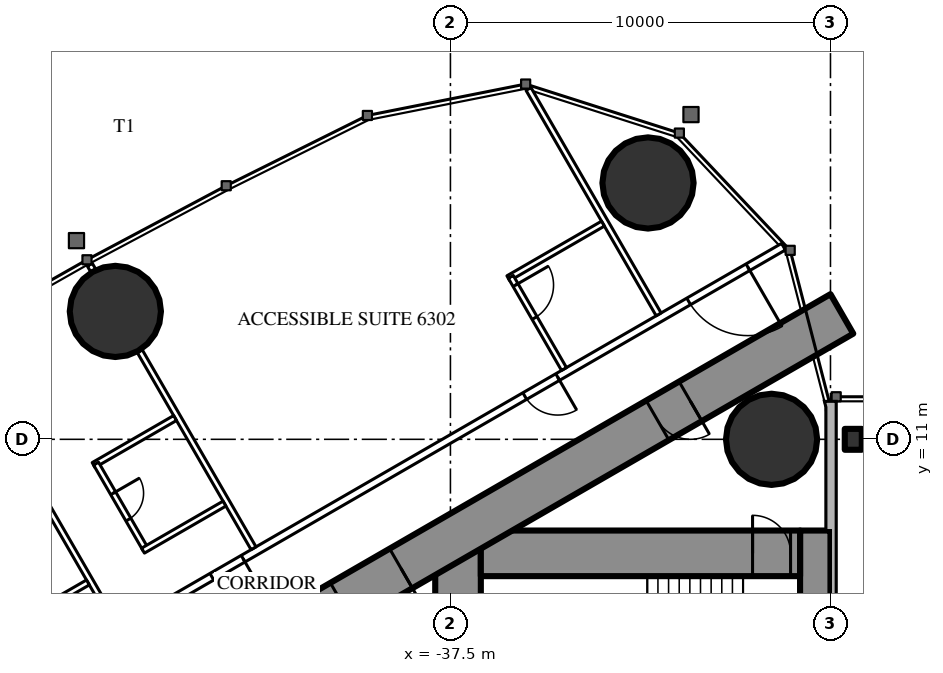
"""IFC4 building model, lengths in metres.
Left out: names, types, materials, properties, quantities, classifications, styles, units other than length and angle.
Written with IfcOpenShell. Run it as: python <this file> out.ifc"""

import sys

from ifc_helpers import new_model, si_unit, direction, frame, frame_2d, origin, origin_2d, place, context, subcontext, project, spatial, rectangle, circle, i_section, extrude, element, fill, save


model = new_model("IFC4")
c1 = context("Model", 3, precision=1e-05, world=origin(), true_north=direction((0.0, 1.0)))
c2 = subcontext(c1, "Body", "Model", "MODEL_VIEW")
j1 = project(units=[si_unit("LENGTHUNIT", "METRE"), si_unit("PLANEANGLEUNIT", "RADIAN")], contexts=[c1])
p1 = place(None, origin())
s1 = spatial("IfcSite", under=j1, at=p1, CompositionType="ELEMENT")
p2 = place(p1, origin())
s2 = spatial("IfcBuilding", under=s1, at=p2, CompositionType="ELEMENT")
p3 = place(p2, frame((0.0, 0.0, 236.9)))
s3 = spatial("IfcBuildingStorey", under=s2, at=p3, CompositionType="ELEMENT", Elevation=236.9)
for number, where, z_axis, x_axis in (
    (1, (-32.301, 17.745, 0.0), (0.0, 0.0, 1.0), (1.0, 0.0, 0.0)),
    (2, (-29.05, 11.0, 0.0), (0.0, 0.0, 1.0), (1.0, 0.0, 0.0)),
    (3, (-46.317, 14.365, 0.0), (0.0, 0.0, 1.0), (1.0, 0.0, 0.0)),
):
    element("IfcColumn", number, at=place(p3, frame(where, z_axis=z_axis, x_axis=x_axis)), inside=s3, PredefinedType="COLUMN", context=c2, shape_type="SweptSolid", body=[
        extrude(circle(Radius=1.2, at=origin_2d()), origin(), (0.0, 0.0, 1.0), 3.6),
    ])
p4 = place(p3, frame((-27.9, 8.6, 0.0), z_axis=(0.0, 0.0, 1.0), x_axis=(0.0, -1.0, 0.0)))
e4 = element("IfcWall", 4, at=p4, inside=s3, PredefinedType="SHEAR", context=c2, shape_type="SweptSolid", body=[
    extrude(rectangle(XDim=17.2, YDim=0.8, at=frame_2d((8.6, 0.0))), origin(), (0.0, 0.0, 1.0), 3.6),
])
p5 = place(p4, frame((6.95, 0.0, 0.0)))
e5 = element("IfcOpeningElement", 5, at=p5, cuts=e4, PredefinedType="OPENING", context=c2, shape_type="SweptSolid", body=[
    extrude(rectangle(XDim=0.9, YDim=2.2, at=frame_2d((0.45, 1.1))), frame((0.0, 0.41, 0.0), z_axis=(0.0, -1.0, 0.0), x_axis=(1.0, 0.0, 0.0)), (0.0, 0.0, 1.0), 0.82),
])
p6 = place(p3, frame((-37.3, 8.6, 0.0), z_axis=(0.0, 0.0, 1.0), x_axis=(0.0, -1.0, 0.0)))
e6 = element("IfcWall", 6, at=p6, inside=s3, PredefinedType="SHEAR", context=c2, shape_type="SweptSolid", body=[
    extrude(rectangle(XDim=17.2, YDim=1.2, at=frame_2d((8.6, 0.0))), origin(), (0.0, 0.0, 1.0), 3.6),
])
p7 = place(p6, frame((7.7, 0.0, 0.0)))
e7 = element("IfcOpeningElement", 7, at=p7, cuts=e6, PredefinedType="OPENING", context=c2, shape_type="SweptSolid", body=[
    extrude(rectangle(XDim=1.8, YDim=2.2, at=frame_2d((0.9, 1.1))), frame((0.0, 0.61, 0.0), z_axis=(0.0, -1.0, 0.0), x_axis=(1.0, 0.0, 0.0)), (0.0, 0.0, 1.0), 1.22),
])
p8 = place(p3, frame((-28.3, 8.0, 0.0), z_axis=(0.0, 0.0, 1.0), x_axis=(-1.0, 0.0, 0.0)))
e8 = element("IfcWall", 8, at=p8, inside=s3, PredefinedType="SHEAR", context=c2, shape_type="SweptSolid", body=[
    extrude(rectangle(XDim=8.4, YDim=1.2, at=frame_2d((4.2, 0.0))), origin(), (0.0, 0.0, 1.0), 3.6),
])
p9 = place(p8, frame((0.25, 0.0, 0.0)))
e9 = element("IfcOpeningElement", 9, at=p9, cuts=e8, PredefinedType="OPENING", context=c2, shape_type="SweptSolid", body=[
    extrude(rectangle(XDim=1.0, YDim=2.2, at=frame_2d((0.5, 1.1))), frame((0.0, 0.61, 0.0), z_axis=(0.0, -1.0, 0.0), x_axis=(1.0, 0.0, 0.0)), (0.0, 0.0, 1.0), 1.22),
])
p10 = place(p3, frame((-27.2, 14.3, 0.0), z_axis=(0.0, 0.0, 1.0), x_axis=(-0.866026593062, -0.499997940104, 0.0)))
e10 = element("IfcWall", 10, at=p10, inside=s3, PredefinedType="SHEAR", context=c2, shape_type="SweptSolid", body=[
    extrude(rectangle(XDim=28.946, YDim=1.2, at=frame_2d((14.473, 0.0))), origin(), (0.0, 0.0, 1.0), 3.6),
])
p11 = place(p10, frame((4.6, 0.0, 0.0)))
e11 = element("IfcOpeningElement", 11, at=p11, cuts=e10, PredefinedType="OPENING", context=c2, shape_type="SweptSolid", body=[
    extrude(rectangle(XDim=1.0, YDim=2.2, at=frame_2d((0.5, 1.1))), frame((0.0, 0.61, 0.0), z_axis=(0.0, -1.0, 0.0), x_axis=(1.0, 0.0, 0.0)), (0.0, 0.0, 1.0), 1.22),
])
p12 = place(p10, frame((13.395, 0.0, 0.0)))
e12 = element("IfcOpeningElement", 12, at=p12, cuts=e10, PredefinedType="OPENING", context=c2, shape_type="SweptSolid", body=[
    extrude(rectangle(XDim=1.8, YDim=2.2, at=frame_2d((0.9, 1.1))), frame((0.0, 0.61, 0.0), z_axis=(0.0, -1.0, 0.0), x_axis=(1.0, 0.0, 0.0)), (0.0, 0.0, 1.0), 1.22),
])
p13 = place(p3, frame((-26.9, 11.0, 0.0), z_axis=(0.0, 0.0, 1.0), x_axis=(1.0, 0.0, 0.0)))
e13 = element("IfcColumn", 13, at=p13, inside=s3, PredefinedType="COLUMN", context=c2, shape_type="SweptSolid", body=[
    extrude(i_section(OverallWidth=0.448, OverallDepth=0.55, WebThickness=0.072, FlangeThickness=0.115, FilletRadius=0.02, at=origin_2d()), origin(), (0.0, 0.0, 1.0), 3.6),
])
p14 = place(p3, frame((-28.737, 16.068, 0.0), z_axis=(0.0, 0.0, 1.0), x_axis=(-0.866026057212, -0.499998868229, 0.0)))
e14 = element("IfcWall", 14, at=p14, inside=s3, PredefinedType="PARTITIONING", context=c2, shape_type="SweptSolid", body=[
    extrude(rectangle(XDim=32.137, YDim=0.2, at=frame_2d((16.068, 0.0))), origin(), (0.0, 0.0, 1.0), 3.35),
])
p15 = place(p14, frame((1.08, 0.0, 0.0)))
e15 = element("IfcOpeningElement", 15, at=p15, cuts=e14, PredefinedType="OPENING", context=c2, shape_type="SweptSolid", body=[
    extrude(rectangle(XDim=1.8, YDim=2.03, at=frame_2d((0.9, 1.015))), frame((0.0, 0.11, 0.0), z_axis=(0.0, -1.0, 0.0), x_axis=(1.0, 0.0, 0.0)), (0.0, 0.0, 1.0), 0.22),
])
p16 = place(p14, frame((6.86, 0.0, 0.0)))
e16 = element("IfcOpeningElement", 16, at=p16, cuts=e14, PredefinedType="OPENING", context=c2, shape_type="SweptSolid", body=[
    extrude(rectangle(XDim=1.0, YDim=2.2, at=frame_2d((0.5, 1.1))), frame((0.0, 0.11, 0.0), z_axis=(0.0, -1.0, 0.0), x_axis=(1.0, 0.0, 0.0)), (0.0, 0.0, 1.0), 0.22),
])
p17 = place(p14, frame((16.418, 0.0, 0.0)))
e17 = element("IfcOpeningElement", 17, at=p17, cuts=e14, PredefinedType="OPENING", context=c2, shape_type="SweptSolid", body=[
    extrude(rectangle(XDim=0.95, YDim=2.2, at=frame_2d((0.475, 1.1))), frame((0.0, 0.11, 0.0), z_axis=(0.0, -1.0, 0.0), x_axis=(1.0, 0.0, 0.0)), (0.0, 0.0, 1.0), 0.22),
])
p18 = place(p14, frame((20.567, 0.0, 0.0)))
e18 = element("IfcOpeningElement", 18, at=p18, cuts=e14, PredefinedType="OPENING", context=c2, shape_type="SweptSolid", body=[
    extrude(rectangle(XDim=0.95, YDim=2.2, at=frame_2d((0.475, 1.1))), frame((0.0, 0.11, 0.0), z_axis=(0.0, -1.0, 0.0), x_axis=(1.0, 0.0, 0.0)), (0.0, 0.0, 1.0), 0.22),
])
p19 = place(p14, frame((27.065, 0.0, 0.0)))
e19 = element("IfcOpeningElement", 19, at=p19, cuts=e14, PredefinedType="OPENING", context=c2, shape_type="SweptSolid", body=[
    extrude(rectangle(XDim=0.95, YDim=2.2, at=frame_2d((0.475, 1.1))), frame((0.0, 0.11, 0.0), z_axis=(0.0, -1.0, 0.0), x_axis=(1.0, 0.0, 0.0)), (0.0, 0.0, 1.0), 0.22),
])
p20 = place(p3, frame((-32.022, 14.287, 0.0), z_axis=(0.0, 0.0, 1.0), x_axis=(-0.50000019414, 0.866025291697, 0.0)))
e20 = element("IfcWall", 20, at=p20, inside=s3, PredefinedType="PARTITIONING", context=c2, shape_type="SweptSolid", body=[
    extrude(rectangle(XDim=6.848, YDim=0.15, at=frame_2d((3.424, 0.0))), origin(), (0.0, 0.0, 1.0), 3.35),
])
p21 = place(p3, frame((-42.68, 8.134, 0.0), z_axis=(0.0, 0.0, 1.0), x_axis=(-0.499984479505, 0.866034364361, 0.0)))
e21 = element("IfcWall", 21, at=p21, inside=s3, PredefinedType="PARTITIONING", context=c2, shape_type="SweptSolid", body=[
    extrude(rectangle(XDim=5.995, YDim=0.15, at=frame_2d((2.998, 0.0))), origin(), (0.0, 0.0, 1.0), 2.45),
])
p22 = place(p3, frame((-46.898, 15.439, 0.0), z_axis=(0.0, 0.0, 1.0), x_axis=(-0.500232303069, 0.865891241997, 0.0)))
e22 = element("IfcWall", 22, at=p22, inside=s3, PredefinedType="PARTITIONING", context=c2, shape_type="SweptSolid", body=[
    extrude(rectangle(XDim=0.18, YDim=0.15, at=frame_2d((0.09, 0.0))), origin(), (0.0, 0.0, 1.0), 2.45),
])
p23 = place(p3, frame((-46.274, 6.059, 0.0), z_axis=(0.0, 0.0, 1.0), x_axis=(-0.500020471368, 0.866013584312, 0.0)))
e23 = element("IfcWall", 23, at=p23, inside=s3, PredefinedType="PARTITIONING", context=c2, shape_type="SweptSolid", body=[
    extrude(rectangle(XDim=6.028, YDim=0.15, at=frame_2d((3.014, 0.0))), origin(), (0.0, 0.0, 1.0), 2.45),
])
p24 = place(p3, frame((-33.487, 16.675, 0.0), z_axis=(0.0, 0.0, 1.0), x_axis=(-0.866039941686, -0.499974818771, 0.0)))
e24 = element("IfcWall", 24, at=p24, inside=s3, PredefinedType="PARTITIONING", context=c2, shape_type="SweptSolid", body=[
    extrude(rectangle(XDim=2.875, YDim=0.15, at=frame_2d((1.438, 0.0))), origin(), (0.0, 0.0, 1.0), 3.35),
])
p25 = place(p3, frame((-34.511, 12.85, 0.0), z_axis=(0.0, 0.0, 1.0), x_axis=(-0.500011755427, 0.866018616679, 0.0)))
e25 = element("IfcWall", 25, at=p25, inside=s3, PredefinedType="PARTITIONING", context=c2, shape_type="SweptSolid", body=[
    extrude(rectangle(XDim=2.8, YDim=0.15, at=frame_2d((1.4, 0.0))), origin(), (0.0, 0.0, 1.0), 3.35),
])
p26 = place(p25, frame((1.55, 0.0, 0.0)))
e26 = element("IfcOpeningElement", 26, at=p26, cuts=e25, PredefinedType="OPENING", context=c2, shape_type="SweptSolid", body=[
    extrude(rectangle(XDim=1.0, YDim=2.2, at=frame_2d((0.5, 1.1))), frame((0.0, 0.085, 0.0), z_axis=(0.0, -1.0, 0.0), x_axis=(1.0, 0.0, 0.0)), (0.0, 0.0, 1.0), 0.17),
])
p27 = place(p3, frame((-44.745, 11.56, 0.0), z_axis=(0.0, 0.0, 1.0), x_axis=(-0.866006523861, -0.500032699561, 0.0)))
e27 = element("IfcWall", 27, at=p27, inside=s3, PredefinedType="PARTITIONING", context=c2, shape_type="SweptSolid", body=[
    extrude(rectangle(XDim=2.475, YDim=0.15, at=frame_2d((1.237, 0.0))), origin(), (0.0, 0.0, 1.0), 3.35),
])
p28 = place(p3, frame((-45.524, 8.109, 0.0), z_axis=(0.0, 0.0, 1.0), x_axis=(-0.49997716683, 0.86603858612, 0.0)))
e28 = element("IfcWall", 28, at=p28, inside=s3, PredefinedType="PARTITIONING", context=c2, shape_type="SweptSolid", body=[
    extrude(rectangle(XDim=2.6, YDim=0.15, at=frame_2d((1.3, 0.0))), origin(), (0.0, 0.0, 1.0), 3.35),
])
p29 = place(p28, frame((0.9, 0.0, 0.0)))
e29 = element("IfcOpeningElement", 29, at=p29, cuts=e28, PredefinedType="OPENING", context=c2, shape_type="SweptSolid", body=[
    extrude(rectangle(XDim=0.8, YDim=2.2, at=frame_2d((0.4, 1.1))), frame((0.0, 0.085, 0.0), z_axis=(0.0, -1.0, 0.0), x_axis=(1.0, 0.0, 0.0)), (0.0, 0.0, 1.0), 0.17),
])
for number, where, z_axis, x_axis in (
    (30, (-43.445, 9.309, 0.0), (0.0, 0.0, 1.0), (-0.866, -0.5, 0.0)),
    (31, (-47.039, 7.234, 0.0), (0.0, 0.0, 1.0), (-0.866, -0.5, 0.0)),
):
    element("IfcWall", number, at=place(p3, frame(where, z_axis=z_axis, x_axis=x_axis)), inside=s3, PredefinedType="PARTITIONING", context=c2, shape_type="SweptSolid", body=[
        extrude(rectangle(XDim=2.475, YDim=0.15, at=frame_2d((1.238, 0.0))), origin(), (0.0, 0.0, 1.0), 3.35),
    ])
p30 = place(p15, origin())
e32 = element("IfcDoor", 32, at=p30, inside=s3, OperationType="DOUBLE_DOOR_SINGLE_SWING", PredefinedType="DOOR", context=c2, shape_type="SweptSolid", body=[
    extrude(rectangle(XDim=1.8, YDim=2.03, at=frame_2d((0.9, 1.015))), frame((0.0, 0.025, 0.0), z_axis=(0.0, -1.0, 0.0), x_axis=(1.0, 0.0, 0.0)), (0.0, 0.0, 1.0), 0.05),
])
fill(e15, e32)
p31 = place(p26, origin())
e33 = element("IfcDoor", 33, at=p31, inside=s3, OperationType="SINGLE_SWING_RIGHT", PredefinedType="DOOR", context=c2, shape_type="SweptSolid", body=[
    extrude(rectangle(XDim=1.0, YDim=2.2, at=frame_2d((0.5, 1.1))), frame((0.0, 0.025, 0.0), z_axis=(0.0, -1.0, 0.0), x_axis=(1.0, 0.0, 0.0)), (0.0, 0.0, 1.0), 0.05),
])
fill(e26, e33)
p32 = place(p16, origin())
e34 = element("IfcDoor", 34, at=p32, inside=s3, OperationType="SINGLE_SWING_LEFT", PredefinedType="DOOR", context=c2, shape_type="SweptSolid", body=[
    extrude(rectangle(XDim=1.0, YDim=2.2, at=frame_2d((0.5, 1.1))), frame((0.0, 0.025, 0.0), z_axis=(0.0, -1.0, 0.0), x_axis=(1.0, 0.0, 0.0)), (0.0, 0.0, 1.0), 0.05),
])
fill(e16, e34)
p33 = place(p29, origin())
e35 = element("IfcDoor", 35, at=p33, inside=s3, OperationType="SINGLE_SWING_RIGHT", PredefinedType="DOOR", context=c2, shape_type="SweptSolid", body=[
    extrude(rectangle(XDim=0.8, YDim=2.2, at=frame_2d((0.4, 1.1))), frame((0.0, 0.025, 0.0), z_axis=(0.0, -1.0, 0.0), x_axis=(1.0, 0.0, 0.0)), (0.0, 0.0, 1.0), 0.05),
])
fill(e29, e35)
p34 = place(p17, origin())
e36 = element("IfcDoor", 36, at=p34, inside=s3, OperationType="SINGLE_SWING_LEFT", PredefinedType="DOOR", context=c2, shape_type="SweptSolid", body=[
    extrude(rectangle(XDim=0.95, YDim=2.2, at=frame_2d((0.475, 1.1))), frame((0.0, 0.025, 0.0), z_axis=(0.0, -1.0, 0.0), x_axis=(1.0, 0.0, 0.0)), (0.0, 0.0, 1.0), 0.05),
])
fill(e17, e36)
p35 = place(p11, origin())
e37 = element("IfcDoor", 37, at=p35, inside=s3, OperationType="SINGLE_SWING_LEFT", PredefinedType="DOOR", context=c2, shape_type="SweptSolid", body=[
    extrude(rectangle(XDim=1.0, YDim=2.2, at=frame_2d((0.5, 1.1))), frame((0.0, 0.025, 0.0), z_axis=(0.0, -1.0, 0.0), x_axis=(1.0, 0.0, 0.0)), (0.0, 0.0, 1.0), 0.05),
])
fill(e11, e37)
p36 = place(p12, origin())
e38 = element("IfcDoor", 38, at=p36, inside=s3, OperationType="DOUBLE_DOOR_SINGLE_SWING", PredefinedType="DOOR", context=c2, shape_type="SweptSolid", body=[
    extrude(rectangle(XDim=1.8, YDim=2.2, at=frame_2d((0.9, 1.1))), frame((0.0, 0.025, 0.0), z_axis=(0.0, -1.0, 0.0), x_axis=(1.0, 0.0, 0.0)), (0.0, 0.0, 1.0), 0.05),
])
fill(e12, e38)
p37 = place(p9, origin())
e39 = element("IfcDoor", 39, at=p37, inside=s3, OperationType="SINGLE_SWING_RIGHT", PredefinedType="DOOR", context=c2, shape_type="SweptSolid", body=[
    extrude(rectangle(XDim=1.0, YDim=2.2, at=frame_2d((0.5, 1.1))), frame((0.0, 0.025, 0.0), z_axis=(0.0, -1.0, 0.0), x_axis=(1.0, 0.0, 0.0)), (0.0, 0.0, 1.0), 0.05),
])
fill(e9, e39)
save(model, sys.argv[1])
